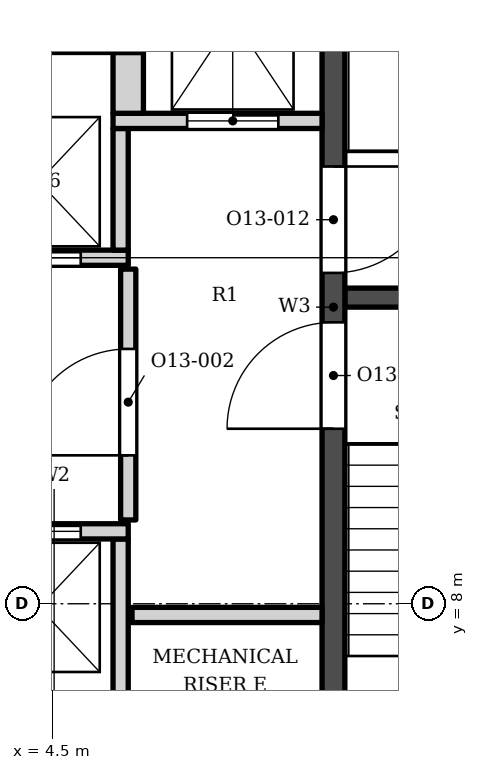
"""IFC4 building model, lengths in metres.
Left out: names, types, materials, properties, quantities, classifications, styles, units other than length and angle.
Written with IfcOpenShell. Run it as: python <this file> out.ifc"""

import sys

from ifc_helpers import new_model, si_unit, direction, frame, frame_2d, origin, place, context, subcontext, project, spatial, rectangle, extrude, element, fill, save


model = new_model("IFC4")
c1 = context("Model", 3, precision=1e-05, world=origin(), true_north=direction((0.0, 1.0)))
c2 = subcontext(c1, "Body", "Model", "MODEL_VIEW")
j1 = project(units=[si_unit("LENGTHUNIT", "METRE"), si_unit("PLANEANGLEUNIT", "RADIAN")], contexts=[c1])
p1 = place(None, origin())
s1 = spatial("IfcSite", under=j1, at=p1, CompositionType="ELEMENT")
p2 = place(p1, origin())
s2 = spatial("IfcBuilding", under=s1, at=p2, CompositionType="ELEMENT")
p3 = place(p2, frame((0.0, 0.0, 287.2)))
s3 = spatial("IfcBuildingStorey", under=s2, at=p3, CompositionType="ELEMENT", Elevation=287.2)
p4 = place(p3, frame((8.2, 5.253, 0.0), z_axis=(0.0, 0.0, 1.0), x_axis=(0.0, 1.0, 0.0)))
e1 = element("IfcWall", 1, at=p4, inside=s3, PredefinedType="SHEAR", context=c2, shape_type="SweptSolid", body=[
    extrude(rectangle(XDim=13.3, YDim=0.3, at=frame_2d((6.65, 0.0))), origin(), (0.0, 0.0, 1.0), 3.9),
])
p5 = place(p4, frame((7.1, 0.0, 0.0)))
e2 = element("IfcOpeningElement", 2, at=p5, cuts=e1, PredefinedType="OPENING", context=c2, shape_type="SweptSolid", body=[
    extrude(rectangle(XDim=1.4, YDim=2.1, at=frame_2d((0.7, 1.05))), frame((0.0, 0.16, 0.0), z_axis=(0.0, -1.0, 0.0), x_axis=(1.0, 0.0, 0.0)), (0.0, 0.0, 1.0), 0.32),
])
p6 = place(p4, frame((5.05, 0.0, 0.0)))
e3 = element("IfcOpeningElement", 3, at=p6, cuts=e1, PredefinedType="OPENING", context=c2, shape_type="SweptSolid", body=[
    extrude(rectangle(XDim=1.4, YDim=2.1, at=frame_2d((0.7, 1.05))), frame((0.0, 0.16, 0.0), z_axis=(0.0, -1.0, 0.0), x_axis=(1.0, 0.0, 0.0)), (0.0, 0.0, 1.0), 0.32),
])
p7 = place(p3, frame((8.35, 12.028, 0.0), z_axis=(0.0, 0.0, 1.0), x_axis=(1.0, 0.0, 0.0)))
e4 = element("IfcWall", 4, at=p7, inside=s3, PredefinedType="SHEAR", context=c2, shape_type="SweptSolid", body=[
    extrude(rectangle(XDim=3.75, YDim=0.25, at=frame_2d((1.875, 0.0))), origin(), (0.0, 0.0, 1.0), 3.9),
])
for number, where, z_axis, x_axis in (
    (5, (5.4, 6.353, 0.0), (0.0, 0.0, 1.0), (0.0, 1.0, 0.0)),
    (6, (5.55, 7.853, 0.0), (0.0, 0.0, 1.0), (1.0, 0.0, 0.0)),
):
    element("IfcWall", number, at=place(p3, frame(where, z_axis=z_axis, x_axis=x_axis)), inside=s3, PredefinedType="SOLIDWALL", context=c2, shape_type="SweptSolid", body=[
        extrude(rectangle(XDim=2.5, YDim=0.2, at=frame_2d((1.25, 0.0))), origin(), (0.0, 0.0, 1.0), 3.73),
    ])
p8 = place(p3, frame((1.0, 8.953, 0.0), z_axis=(0.0, 0.0, 1.0), x_axis=(1.0, 0.0, 0.0)))
e7 = element("IfcWall", 7, at=p8, inside=s3, PredefinedType="SOLIDWALL", context=c2, shape_type="SweptSolid", body=[
    extrude(rectangle(XDim=4.5, YDim=0.2, at=frame_2d((2.25, 0.0))), origin(), (0.0, 0.0, 1.0), 3.73),
])
p9 = place(p8, frame((0.625, 0.0, 0.0)))
e8 = element("IfcOpeningElement", 8, at=p9, cuts=e7, PredefinedType="OPENING", context=c2, shape_type="SweptSolid", body=[
    extrude(rectangle(XDim=1.1, YDim=2.1, at=frame_2d((0.55, 1.05))), frame((0.0, 0.11, 0.0), z_axis=(0.0, -1.0, 0.0), x_axis=(1.0, 0.0, 0.0)), (0.0, 0.0, 1.0), 0.22),
])
p10 = place(p8, frame((2.775, 0.0, 0.0)))
e9 = element("IfcOpeningElement", 9, at=p10, cuts=e7, PredefinedType="OPENING", context=c2, shape_type="SweptSolid", body=[
    extrude(rectangle(XDim=1.1, YDim=2.1, at=frame_2d((0.55, 1.05))), frame((0.0, 0.11, 0.0), z_axis=(0.0, -1.0, 0.0), x_axis=(1.0, 0.0, 0.0)), (0.0, 0.0, 1.0), 0.22),
])
p11 = place(p3, frame((5.5, 9.103, 0.0), z_axis=(0.0, 0.0, 1.0), x_axis=(0.0, 1.0, 0.0)))
e10 = element("IfcWall", 10, at=p11, inside=s3, PredefinedType="SOLIDWALL", context=c2, shape_type="SweptSolid", body=[
    extrude(rectangle(XDim=3.3, YDim=0.2, at=frame_2d((1.65, 0.0))), origin(), (0.0, 0.0, 1.0), 3.73),
])
p12 = place(p11, frame((0.85, 0.0, 0.0)))
e11 = element("IfcOpeningElement", 11, at=p12, cuts=e10, PredefinedType="OPENING", context=c2, shape_type="SweptSolid", body=[
    extrude(rectangle(XDim=1.4, YDim=2.1, at=frame_2d((0.7, 1.05))), frame((0.0, 0.11, 0.0), z_axis=(0.0, -1.0, 0.0), x_axis=(1.0, 0.0, 0.0)), (0.0, 0.0, 1.0), 0.22),
])
p13 = place(p3, frame((-1.5, 12.552, 0.0), z_axis=(0.0, 0.0, 1.0), x_axis=(1.0, 0.0, 0.0)))
e12 = element("IfcWall", 12, at=p13, inside=s3, PredefinedType="SOLIDWALL", context=c2, shape_type="SweptSolid", body=[
    extrude(rectangle(XDim=7.0, YDim=0.2, at=frame_2d((3.5, 0.0))), origin(), (0.0, 0.0, 1.0), 3.73),
])
p14 = place(p13, frame((3.075, 0.0, 0.0)))
e13 = element("IfcOpeningElement", 13, at=p14, cuts=e12, PredefinedType="OPENING", context=c2, shape_type="SweptSolid", body=[
    extrude(rectangle(XDim=1.1, YDim=2.1, at=frame_2d((0.55, 1.05))), frame((0.0, 0.11, 0.0), z_axis=(0.0, -1.0, 0.0), x_axis=(1.0, 0.0, 0.0)), (0.0, 0.0, 1.0), 0.22),
])
p15 = place(p13, frame((5.275, 0.0, 0.0)))
e14 = element("IfcOpeningElement", 14, at=p15, cuts=e12, PredefinedType="OPENING", context=c2, shape_type="SweptSolid", body=[
    extrude(rectangle(XDim=1.1, YDim=2.1, at=frame_2d((0.55, 1.05))), frame((0.0, 0.11, 0.0), z_axis=(0.0, -1.0, 0.0), x_axis=(1.0, 0.0, 0.0)), (0.0, 0.0, 1.0), 0.22),
])
p16 = place(p3, frame((5.4, 12.653, 0.0), z_axis=(0.0, 0.0, 1.0), x_axis=(0.0, 1.0, 0.0)))
e15 = element("IfcWall", 15, at=p16, inside=s3, PredefinedType="SOLIDWALL", context=c2, shape_type="SweptSolid", body=[
    extrude(rectangle(XDim=1.6, YDim=0.2, at=frame_2d((0.8, 0.0))), origin(), (0.0, 0.0, 1.0), 3.73),
])
p17 = place(p3, frame((5.3, 14.353, 0.0), z_axis=(0.0, 0.0, 1.0), x_axis=(1.0, 0.0, 0.0)))
e16 = element("IfcWall", 16, at=p17, inside=s3, PredefinedType="SOLIDWALL", context=c2, shape_type="SweptSolid", body=[
    extrude(rectangle(XDim=2.75, YDim=0.2, at=frame_2d((1.375, 0.0))), origin(), (0.0, 0.0, 1.0), 3.73),
])
p18 = place(p17, frame((0.975, 0.0, 0.0)))
e17 = element("IfcOpeningElement", 17, at=p18, cuts=e16, PredefinedType="OPENING", context=c2, shape_type="SweptSolid", body=[
    extrude(rectangle(XDim=1.2, YDim=2.1, at=frame_2d((0.6, 1.05))), frame((0.0, 0.11, 0.0), z_axis=(0.0, -1.0, 0.0), x_axis=(1.0, 0.0, 0.0)), (0.0, 0.0, 1.0), 0.22),
])
p19 = place(p3, frame((5.5, 14.453, 0.0), z_axis=(0.0, 0.0, 1.0), x_axis=(0.0, 1.0, 0.0)))
e18 = element("IfcWall", 18, at=p19, inside=s3, PredefinedType="SOLIDWALL", context=c2, shape_type="SweptSolid", body=[
    extrude(rectangle(XDim=0.8, YDim=0.4, at=frame_2d((0.4, 0.0))), origin(), (0.0, 0.0, 1.0), 3.73),
])
p20 = place(p3, frame((-1.5, 15.353, 0.0), z_axis=(0.0, 0.0, 1.0), x_axis=(1.0, 0.0, 0.0)))
e19 = element("IfcWall", 19, at=p20, inside=s3, PredefinedType="SOLIDWALL", context=c2, shape_type="SweptSolid", body=[
    extrude(rectangle(XDim=7.2, YDim=0.2, at=frame_2d((3.6, 0.0))), origin(), (0.0, 0.0, 1.0), 3.73),
])
p21 = place(p10, origin())
e20 = element("IfcDoor", 20, at=p21, inside=s3, OperationType="DOUBLE_DOOR_SLIDING", PredefinedType="DOOR", context=c2, shape_type="SweptSolid", body=[
    extrude(rectangle(XDim=1.1, YDim=2.1, at=frame_2d((0.55, 1.05))), frame((0.0, 0.025, 0.0), z_axis=(0.0, -1.0, 0.0), x_axis=(1.0, 0.0, 0.0)), (0.0, 0.0, 1.0), 0.05),
])
fill(e9, e20)
p22 = place(p15, origin())
e21 = element("IfcDoor", 21, at=p22, inside=s3, OperationType="DOUBLE_DOOR_SLIDING", PredefinedType="DOOR", context=c2, shape_type="SweptSolid", body=[
    extrude(rectangle(XDim=1.1, YDim=2.1, at=frame_2d((0.55, 1.05))), frame((0.0, 0.025, 0.0), z_axis=(0.0, -1.0, 0.0), x_axis=(1.0, 0.0, 0.0)), (0.0, 0.0, 1.0), 0.05),
])
fill(e14, e21)
p23 = place(p18, origin())
e22 = element("IfcDoor", 22, at=p23, inside=s3, OperationType="DOUBLE_DOOR_SLIDING", PredefinedType="DOOR", context=c2, shape_type="SweptSolid", body=[
    extrude(rectangle(XDim=1.2, YDim=2.1, at=frame_2d((0.6, 1.05))), frame((0.0, 0.025, 0.0), z_axis=(0.0, -1.0, 0.0), x_axis=(1.0, 0.0, 0.0)), (0.0, 0.0, 1.0), 0.05),
])
fill(e17, e22)
p24 = place(p5, origin())
e23 = element("IfcDoor", 23, at=p24, inside=s3, OperationType="SINGLE_SWING_RIGHT", PredefinedType="DOOR", context=c2, shape_type="SweptSolid", body=[
    extrude(rectangle(XDim=1.4, YDim=2.1, at=frame_2d((0.7, 1.05))), frame((0.0, 0.025, 0.0), z_axis=(0.0, -1.0, 0.0), x_axis=(1.0, 0.0, 0.0)), (0.0, 0.0, 1.0), 0.05),
])
fill(e2, e23)
p25 = place(p6, origin())
e24 = element("IfcDoor", 24, at=p25, inside=s3, OperationType="SINGLE_SWING_LEFT", PredefinedType="DOOR", context=c2, shape_type="SweptSolid", body=[
    extrude(rectangle(XDim=1.4, YDim=2.1, at=frame_2d((0.7, 1.05))), frame((0.0, 0.025, 0.0), z_axis=(0.0, -1.0, 0.0), x_axis=(1.0, 0.0, 0.0)), (0.0, 0.0, 1.0), 0.05),
])
fill(e3, e24)
p26 = place(p12, origin())
e25 = element("IfcDoor", 25, at=p26, inside=s3, OperationType="SINGLE_SWING_LEFT", PredefinedType="DOOR", context=c2, shape_type="SweptSolid", body=[
    extrude(rectangle(XDim=1.4, YDim=2.1, at=frame_2d((0.7, 1.05))), frame((0.0, 0.025, 0.0), z_axis=(0.0, -1.0, 0.0), x_axis=(1.0, 0.0, 0.0)), (0.0, 0.0, 1.0), 0.05),
])
fill(e11, e25)
save(model, sys.argv[1])
